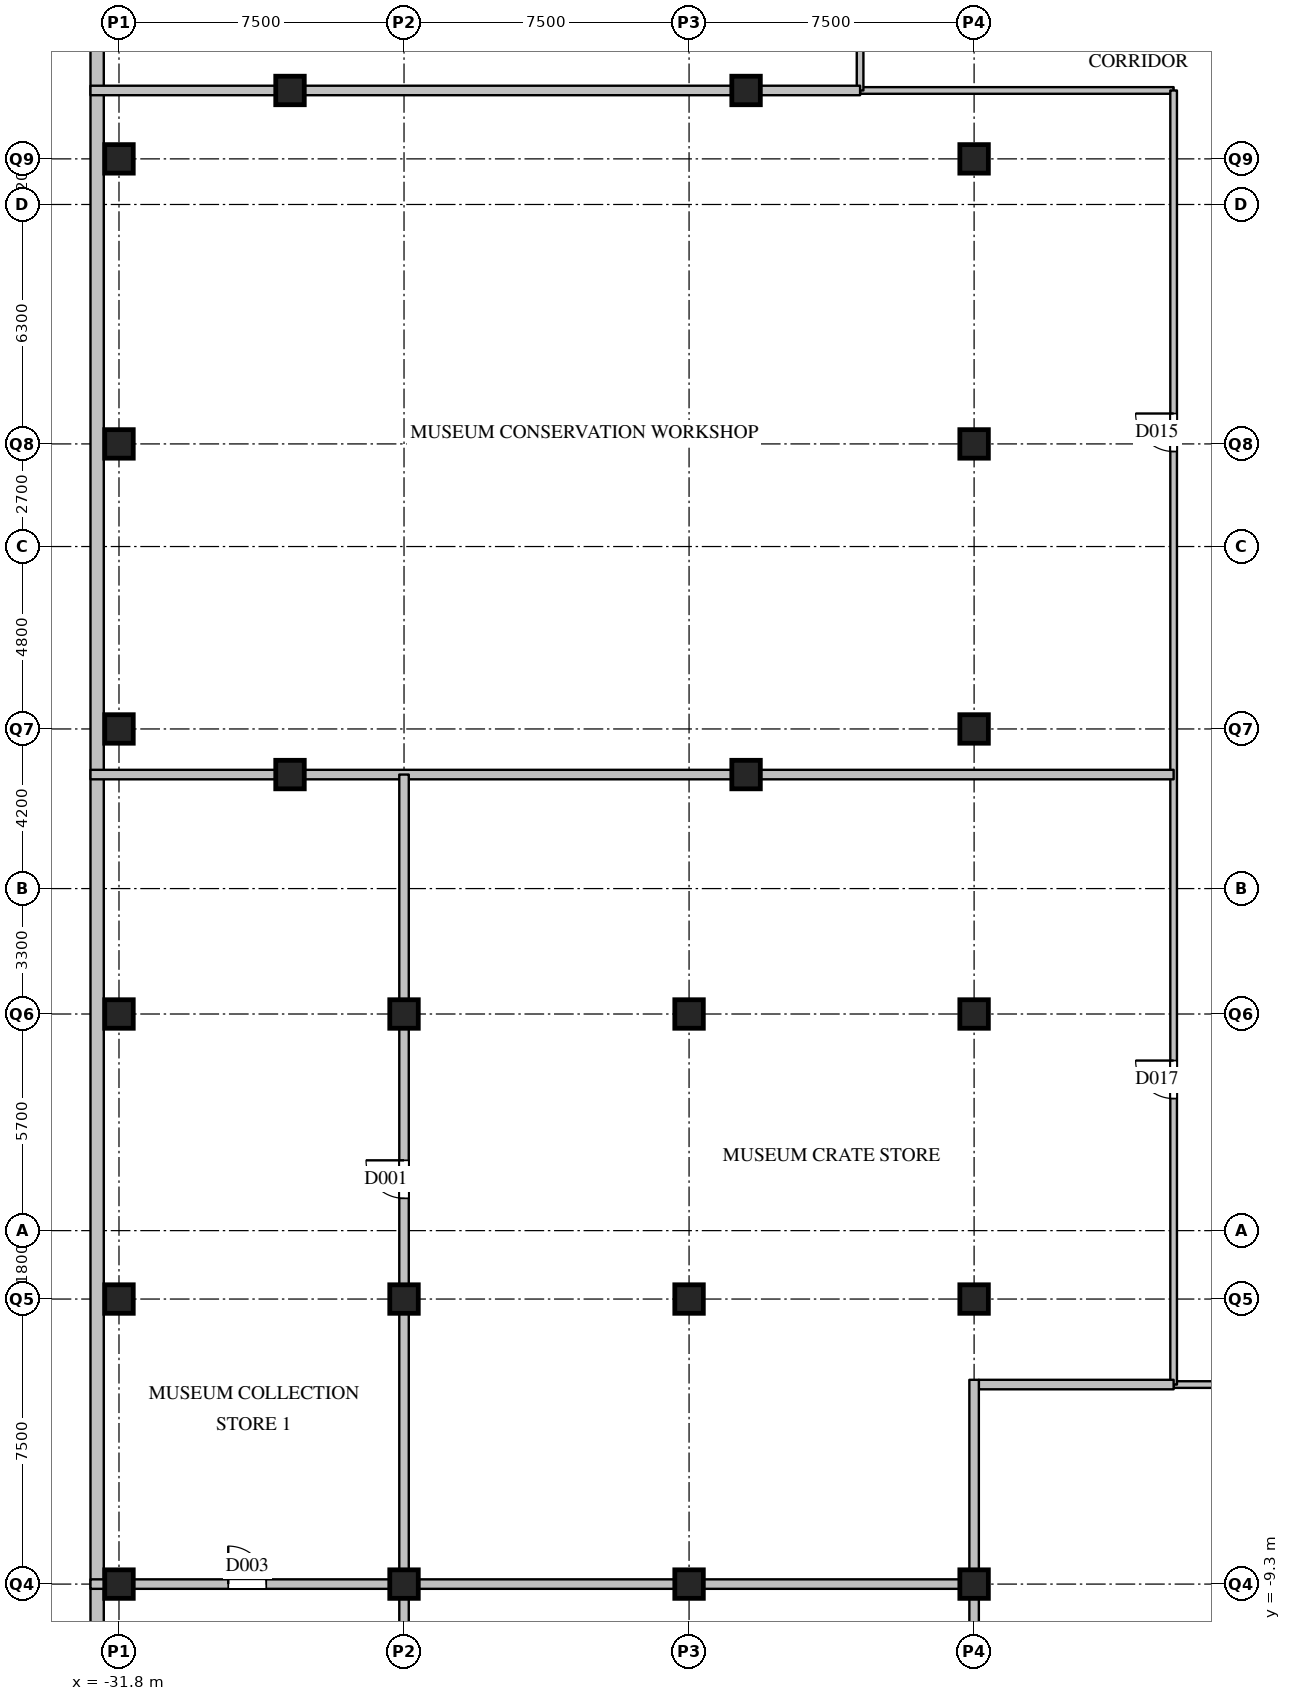
"""IFC4 building model, lengths in metres.
Left out: names, types, materials, properties, quantities, classifications, styles, units other than length and angle.
Written with IfcOpenShell. Run it as: python <this file> out.ifc"""

import sys

from ifc_helpers import new_model, si_unit, direction, frame, frame_2d, origin, origin_2d, place, context, subcontext, project, spatial, rectangle, extrude, element, fill, save


model = new_model("IFC4")
c1 = context("Model", 3, precision=1e-05, world=origin(), true_north=direction((0.0, 1.0)))
c2 = subcontext(c1, "Body", "Model", "MODEL_VIEW")
j1 = project(units=[si_unit("LENGTHUNIT", "METRE"), si_unit("PLANEANGLEUNIT", "RADIAN")], contexts=[c1])
p1 = place(None, origin())
s1 = spatial("IfcSite", under=j1, at=p1, CompositionType="ELEMENT")
p2 = place(p1, origin())
s2 = spatial("IfcBuilding", under=s1, at=p2, CompositionType="ELEMENT")
p3 = place(p2, frame((0.0, 0.0, -6.0)))
s3 = spatial("IfcBuildingStorey", under=s2, at=p3, CompositionType="ELEMENT", Elevation=-6.0)
p4 = place(p3, frame((-32.375, -20.95, 0.0), z_axis=(0.0, 0.0, 1.0), x_axis=(0.0, 1.0, 0.0)))
e1 = element("IfcWall", 1, at=p4, inside=s3, PredefinedType="SOLIDWALL", context=c2, shape_type="SweptSolid", body=[
    extrude(rectangle(XDim=68.3, YDim=0.35, at=frame_2d((34.15, 0.0))), origin(), (0.0, 0.0, 1.0), 5.59),
])
for number, where, z_axis, x_axis in (
    (2, (-31.8, -9.3, 0.0), (0.0, 0.0, 1.0), (1.0, 0.0, 0.0)),
    (3, (-31.8, -1.8, 0.0), (0.0, 0.0, 1.0), (1.0, 0.0, 0.0)),
    (4, (-31.8, 5.7, 0.0), (0.0, 0.0, 1.0), (1.0, 0.0, 0.0)),
    (5, (-31.8, 13.2, 0.0), (0.0, 0.0, 1.0), (1.0, 0.0, 0.0)),
    (6, (-31.8, 20.7, 0.0), (0.0, 0.0, 1.0), (1.0, 0.0, 0.0)),
    (7, (-31.8, 28.2, 0.0), (0.0, 0.0, 1.0), (1.0, 0.0, 0.0)),
    (8, (-24.3, -9.3, 0.0), (0.0, 0.0, 1.0), (1.0, 0.0, 0.0)),
    (9, (-24.3, -1.8, 0.0), (0.0, 0.0, 1.0), (1.0, 0.0, 0.0)),
    (10, (-24.3, 5.7, 0.0), (0.0, 0.0, 1.0), (1.0, 0.0, 0.0)),
    (11, (-16.8, -9.3, 0.0), (0.0, 0.0, 1.0), (1.0, 0.0, 0.0)),
    (12, (-16.8, -1.8, 0.0), (0.0, 0.0, 1.0), (1.0, 0.0, 0.0)),
    (13, (-16.8, 5.7, 0.0), (0.0, 0.0, 1.0), (1.0, 0.0, 0.0)),
    (14, (-9.3, -9.3, 0.0), (0.0, 0.0, 1.0), (1.0, 0.0, 0.0)),
    (15, (-9.3, -1.8, 0.0), (0.0, 0.0, 1.0), (1.0, 0.0, 0.0)),
    (16, (-9.3, 5.7, 0.0), (0.0, 0.0, 1.0), (1.0, 0.0, 0.0)),
    (17, (-9.3, 13.2, 0.0), (0.0, 0.0, 1.0), (1.0, 0.0, 0.0)),
    (18, (-9.3, 20.7, 0.0), (0.0, 0.0, 1.0), (1.0, 0.0, 0.0)),
    (19, (-9.3, 28.2, 0.0), (0.0, 0.0, 1.0), (1.0, 0.0, 0.0)),
    (20, (-27.3, 12.0, 0.0), (0.0, 0.0, 1.0), (1.0, 0.0, 0.0)),
    (21, (-15.3, 12.0, 0.0), (0.0, 0.0, 1.0), (1.0, 0.0, 0.0)),
    (22, (-15.3, 30.0, 0.0), (0.0, 0.0, 1.0), (1.0, 0.0, 0.0)),
    (23, (-27.3, 30.0, 0.0), (0.0, 0.0, 1.0), (1.0, 0.0, 0.0)),
):
    element("IfcColumn", number, at=place(p3, frame(where, z_axis=z_axis, x_axis=x_axis)), inside=s3, PredefinedType="COLUMN", context=c2, shape_type="SweptSolid", body=[
        extrude(rectangle(XDim=0.75, YDim=0.75, at=origin_2d()), origin(), (0.0, 0.0, 1.0), 6.0),
    ])
p5 = place(p3, frame((-4.05, -4.05, 0.0), z_axis=(0.0, 0.0, 1.0), x_axis=(1.0, 0.0, 0.0)))
e24 = element("IfcWall", 24, at=p5, inside=s3, PredefinedType="PARTITIONING", context=c2, shape_type="SweptSolid", body=[
    extrude(rectangle(XDim=18.0, YDim=0.175, at=frame_2d((9.0, 0.0))), origin(), (0.0, 0.0, 1.0), 4.79),
])
p6 = place(p5, frame((8.5, 0.0, 0.0)))
e25 = element("IfcOpeningElement", 25, at=p6, cuts=e24, PredefinedType="OPENING", context=c2, shape_type="SweptSolid", body=[
    extrude(rectangle(XDim=1.0, YDim=2.1, at=frame_2d((0.5, 1.05))), frame((0.0, 0.097, 0.0), z_axis=(0.0, -1.0, 0.0), x_axis=(1.0, 0.0, 0.0)), (0.0, 0.0, 1.0), 0.195),
])
p7 = place(p3, frame((-12.3, 30.0, 0.0), z_axis=(0.0, 0.0, 1.0), x_axis=(1.0, 0.0, 0.0)))
e26 = element("IfcWall", 26, at=p7, inside=s3, PredefinedType="PARTITIONING", context=c2, shape_type="SweptSolid", body=[
    extrude(rectangle(XDim=8.25, YDim=0.175, at=frame_2d((4.125, 0.0))), origin(), (0.0, 0.0, 1.0), 4.79),
])
p8 = place(p3, frame((-12.3, 30.0, 0.0), z_axis=(0.0, 0.0, 1.0), x_axis=(0.0, 1.0, 0.0)))
e27 = element("IfcWall", 27, at=p8, inside=s3, PredefinedType="PARTITIONING", context=c2, shape_type="SweptSolid", body=[
    extrude(rectangle(XDim=28.95, YDim=0.175, at=frame_2d((14.475, 0.0))), origin(), (0.0, 0.0, 1.0), 4.79),
])
p9 = place(p8, frame((13.975, 0.0, 0.0)))
e28 = element("IfcOpeningElement", 28, at=p9, cuts=e27, PredefinedType="OPENING", context=c2, shape_type="SweptSolid", body=[
    extrude(rectangle(XDim=1.0, YDim=2.1, at=frame_2d((0.5, 1.05))), frame((0.0, 0.097, 0.0), z_axis=(0.0, -1.0, 0.0), x_axis=(1.0, 0.0, 0.0)), (0.0, 0.0, 1.0), 0.195),
])
p10 = place(p3, frame((-4.05, -4.05, 0.0), z_axis=(0.0, 0.0, 1.0), x_axis=(0.0, 1.0, 0.0)))
e29 = element("IfcWall", 29, at=p10, inside=s3, PredefinedType="PARTITIONING", context=c2, shape_type="SweptSolid", body=[
    extrude(rectangle(XDim=34.05, YDim=0.175, at=frame_2d((17.025, 0.0))), origin(), (0.0, 0.0, 1.0), 4.79),
])
p11 = place(p10, frame((24.55, 0.0, 0.0)))
e30 = element("IfcOpeningElement", 30, at=p11, cuts=e29, PredefinedType="OPENING", context=c2, shape_type="SweptSolid", body=[
    extrude(rectangle(XDim=1.0, YDim=2.1, at=frame_2d((0.5, 1.05))), frame((0.0, 0.097, 0.0), z_axis=(0.0, -1.0, 0.0), x_axis=(1.0, 0.0, 0.0)), (0.0, 0.0, 1.0), 0.195),
])
p12 = place(p10, frame((7.525, 0.0, 0.0)))
e31 = element("IfcOpeningElement", 31, at=p12, cuts=e29, PredefinedType="OPENING", context=c2, shape_type="SweptSolid", body=[
    extrude(rectangle(XDim=1.0, YDim=2.1, at=frame_2d((0.5, 1.05))), frame((0.0, 0.097, 0.0), z_axis=(0.0, -1.0, 0.0), x_axis=(1.0, 0.0, 0.0)), (0.0, 0.0, 1.0), 0.195),
])
p13 = place(p3, frame((-32.55, -9.3, 0.0), z_axis=(0.0, 0.0, 1.0), x_axis=(1.0, 0.0, 0.0)))
e32 = element("IfcWall", 32, at=p13, inside=s3, PredefinedType="PARTITIONING", context=c2, shape_type="SweptSolid", body=[
    extrude(rectangle(XDim=23.25, YDim=0.25, at=frame_2d((11.625, 0.0))), origin(), (0.0, 0.0, 1.0), 4.79),
])
p14 = place(p13, frame((3.625, 0.0, 0.0)))
e33 = element("IfcOpeningElement", 33, at=p14, cuts=e32, PredefinedType="OPENING", context=c2, shape_type="SweptSolid", body=[
    extrude(rectangle(XDim=1.0, YDim=2.1, at=frame_2d((0.5, 1.05))), frame((0.0, 0.135, 0.0), z_axis=(0.0, -1.0, 0.0), x_axis=(1.0, 0.0, 0.0)), (0.0, 0.0, 1.0), 0.27),
])
p15 = place(p3, frame((-9.175, -4.05, 0.0), z_axis=(0.0, 0.0, 1.0), x_axis=(1.0, 0.0, 0.0)))
e34 = element("IfcWall", 34, at=p15, inside=s3, PredefinedType="PARTITIONING", context=c2, shape_type="SweptSolid", body=[
    extrude(rectangle(XDim=5.125, YDim=0.25, at=frame_2d((2.562, 0.0))), origin(), (0.0, 0.0, 1.0), 4.79),
])
p16 = place(p3, frame((-32.55, 12.0, 0.0), z_axis=(0.0, 0.0, 1.0), x_axis=(1.0, 0.0, 0.0)))
e35 = element("IfcWall", 35, at=p16, inside=s3, PredefinedType="PARTITIONING", context=c2, shape_type="SweptSolid", body=[
    extrude(rectangle(XDim=28.5, YDim=0.25, at=frame_2d((14.25, 0.0))), origin(), (0.0, 0.0, 1.0), 4.79),
])
p17 = place(p3, frame((-32.55, 30.0, 0.0), z_axis=(0.0, 0.0, 1.0), x_axis=(1.0, 0.0, 0.0)))
e36 = element("IfcWall", 36, at=p17, inside=s3, PredefinedType="PARTITIONING", context=c2, shape_type="SweptSolid", body=[
    extrude(rectangle(XDim=20.25, YDim=0.25, at=frame_2d((10.125, 0.0))), origin(), (0.0, 0.0, 1.0), 4.79),
])
p18 = place(p3, frame((-24.3, -20.95, 0.0), z_axis=(0.0, 0.0, 1.0), x_axis=(0.0, 1.0, 0.0)))
e37 = element("IfcWall", 37, at=p18, inside=s3, PredefinedType="PARTITIONING", context=c2, shape_type="SweptSolid", body=[
    extrude(rectangle(XDim=32.95, YDim=0.25, at=frame_2d((16.475, 0.0))), origin(), (0.0, 0.0, 1.0), 4.79),
])
p19 = place(p18, frame((21.8, 0.0, 0.0)))
e38 = element("IfcOpeningElement", 38, at=p19, cuts=e37, PredefinedType="OPENING", context=c2, shape_type="SweptSolid", body=[
    extrude(rectangle(XDim=1.0, YDim=2.1, at=frame_2d((0.5, 1.05))), frame((0.0, 0.135, 0.0), z_axis=(0.0, -1.0, 0.0), x_axis=(1.0, 0.0, 0.0)), (0.0, 0.0, 1.0), 0.27),
])
p20 = place(p3, frame((-9.3, -32.55, 0.0), z_axis=(0.0, 0.0, 1.0), x_axis=(0.0, 1.0, 0.0)))
e39 = element("IfcWall", 39, at=p20, inside=s3, PredefinedType="PARTITIONING", context=c2, shape_type="SweptSolid", body=[
    extrude(rectangle(XDim=28.625, YDim=0.25, at=frame_2d((14.312, 0.0))), origin(), (0.0, 0.0, 1.0), 4.79),
])
p21 = place(p20, frame((11.125, 0.0, 0.0)))
e40 = element("IfcOpeningElement", 40, at=p21, cuts=e39, PredefinedType="OPENING", context=c2, shape_type="SweptSolid", body=[
    extrude(rectangle(XDim=1.0, YDim=2.1, at=frame_2d((0.5, 1.05))), frame((0.0, 0.135, 0.0), z_axis=(0.0, -1.0, 0.0), x_axis=(1.0, 0.0, 0.0)), (0.0, 0.0, 1.0), 0.27),
])
p22 = place(p19, origin())
e41 = element("IfcDoor", 41, at=p22, inside=s3, OperationType="SINGLE_SWING_RIGHT", PredefinedType="DOOR", context=c2, shape_type="SweptSolid", body=[
    extrude(rectangle(XDim=1.0, YDim=2.1, at=frame_2d((0.5, 1.05))), frame((0.0, 0.025, 0.0), z_axis=(0.0, -1.0, 0.0), x_axis=(1.0, 0.0, 0.0)), (0.0, 0.0, 1.0), 0.05),
])
fill(e38, e41)
p23 = place(p14, origin())
e42 = element("IfcDoor", 42, at=p23, inside=s3, OperationType="SINGLE_SWING_LEFT", PredefinedType="DOOR", context=c2, shape_type="SweptSolid", body=[
    extrude(rectangle(XDim=1.0, YDim=2.1, at=frame_2d((0.5, 1.05))), frame((0.0, 0.025, 0.0), z_axis=(0.0, -1.0, 0.0), x_axis=(1.0, 0.0, 0.0)), (0.0, 0.0, 1.0), 0.05),
])
fill(e33, e42)
p24 = place(p11, origin())
e43 = element("IfcDoor", 43, at=p24, inside=s3, OperationType="SINGLE_SWING_RIGHT", PredefinedType="DOOR", context=c2, shape_type="SweptSolid", body=[
    extrude(rectangle(XDim=1.0, YDim=2.1, at=frame_2d((0.5, 1.05))), frame((0.0, 0.025, 0.0), z_axis=(0.0, -1.0, 0.0), x_axis=(1.0, 0.0, 0.0)), (0.0, 0.0, 1.0), 0.05),
])
fill(e30, e43)
p25 = place(p12, origin())
e44 = element("IfcDoor", 44, at=p25, inside=s3, OperationType="SINGLE_SWING_RIGHT", PredefinedType="DOOR", context=c2, shape_type="SweptSolid", body=[
    extrude(rectangle(XDim=1.0, YDim=2.1, at=frame_2d((0.5, 1.05))), frame((0.0, 0.025, 0.0), z_axis=(0.0, -1.0, 0.0), x_axis=(1.0, 0.0, 0.0)), (0.0, 0.0, 1.0), 0.05),
])
fill(e31, e44)
save(model, sys.argv[1])
